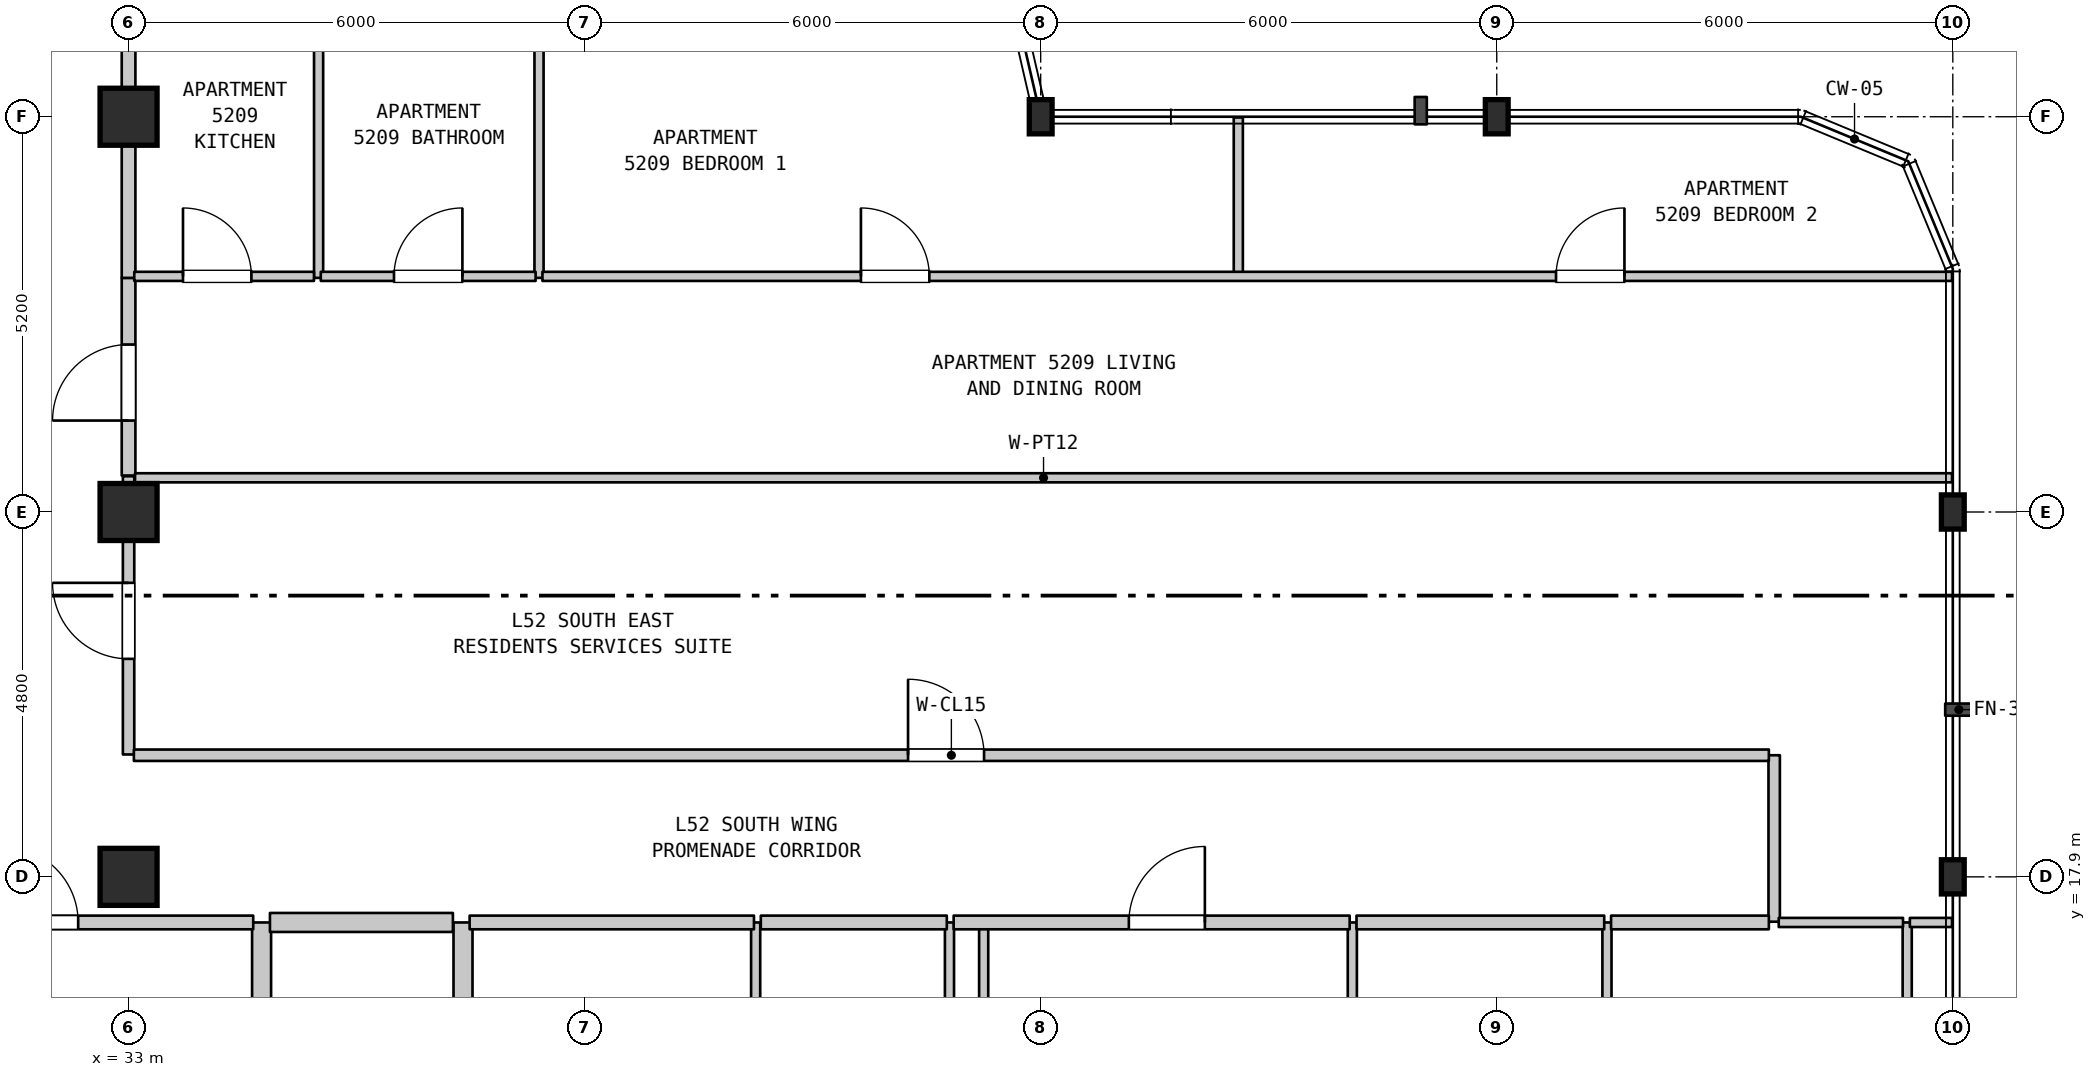
"""IFC4 building model, lengths in metres.
Left out: names, types, materials, properties, quantities, classifications, styles, units other than length and angle.
Written with IfcOpenShell. Run it as: python <this file> out.ifc"""

import sys

from ifc_helpers import new_model, si_unit, direction, frame, frame_2d, origin, origin_2d, place, context, subcontext, project, spatial, rectangle, i_section, extrude, element, fill, save


model = new_model("IFC4")
c1 = context("Model", 3, precision=1e-05, world=origin(), true_north=direction((0.0, 1.0)))
c2 = subcontext(c1, "Body", "Model", "MODEL_VIEW")
j1 = project(units=[si_unit("LENGTHUNIT", "METRE"), si_unit("PLANEANGLEUNIT", "RADIAN")], contexts=[c1])
p1 = place(None, origin())
s1 = spatial("IfcSite", under=j1, at=p1, CompositionType="ELEMENT")
p2 = place(p1, origin())
s2 = spatial("IfcBuilding", under=s1, at=p2, CompositionType="ELEMENT")
p3 = place(p2, frame((0.0, 0.0, 210.6)))
s3 = spatial("IfcBuildingStorey", under=s2, at=p3, CompositionType="ELEMENT", Elevation=210.6)
for number, where, z_axis, x_axis in (
    (1, (33.0, 17.9, 0.0), (0.0, 0.0, 1.0), (1.0, 0.0, 0.0)),
    (2, (33.0, 22.7, 0.0), (0.0, 0.0, 1.0), (1.0, 0.0, 0.0)),
    (3, (33.0, 27.9, 0.0), (0.0, 0.0, 1.0), (1.0, 0.0, 0.0)),
):
    element("IfcColumn", number, at=place(p3, frame(where, z_axis=z_axis, x_axis=x_axis)), inside=s3, PredefinedType="COLUMN", context=c2, shape_type="SweptSolid", body=[
        extrude(rectangle(XDim=0.75, YDim=0.75, at=origin_2d()), origin(), (0.0, 0.0, 1.0), 3.7),
    ])
for number, where, z_axis, x_axis in (
    (4, (45.0, 27.9, 0.0), (0.0, 0.0, 1.0), (1.0, 0.0, 0.0)),
    (5, (51.0, 27.9, 0.0), (0.0, 0.0, 1.0), (1.0, 0.0, 0.0)),
    (6, (57.0, 17.9, 0.0), (0.0, 0.0, 1.0), (1.0, 0.0, 0.0)),
    (7, (57.0, 22.7, 0.0), (0.0, 0.0, 1.0), (1.0, 0.0, 0.0)),
):
    element("IfcColumn", number, at=place(p3, frame(where, z_axis=z_axis, x_axis=x_axis)), inside=s3, PredefinedType="COLUMN", context=c2, shape_type="SweptSolid", body=[
        extrude(i_section(OverallWidth=0.3, OverallDepth=0.45, WebThickness=0.014, FlangeThickness=0.026, FilletRadius=0.027, at=origin_2d()), origin(), (0.0, 0.0, 1.0), 3.7),
    ])
p4 = place(p3, frame((33.0, 19.51, 0.0), z_axis=(0.0, 0.0, 1.0), x_axis=(0.0, 1.0, 0.0)))
e8 = element("IfcWall", 8, at=p4, inside=s3, PredefinedType="STANDARD", context=c2, shape_type="SweptSolid", body=[
    extrude(rectangle(XDim=3.66, YDim=0.15, at=frame_2d((1.83, 0.0))), origin(), (0.0, 0.0, 1.0), 2.99),
])
p5 = place(p4, frame((1.258, 0.0, 0.0)))
e9 = element("IfcOpeningElement", 9, at=p5, cuts=e8, PredefinedType="OPENING", context=c2, shape_type="SweptSolid", body=[
    extrude(rectangle(XDim=1.0, YDim=2.15, at=frame_2d((0.5, 1.075))), frame((0.0, 0.085, 0.0), z_axis=(0.0, -1.0, 0.0), x_axis=(1.0, 0.0, 0.0)), (0.0, 0.0, 1.0), 0.17),
])
p6 = place(p3, frame((33.0, 23.18, 0.0), z_axis=(0.0, 0.0, 1.0), x_axis=(0.0, 1.0, 0.0)))
e10 = element("IfcWall", 10, at=p6, inside=s3, PredefinedType="STANDARD", context=c2, shape_type="SweptSolid", body=[
    extrude(rectangle(XDim=2.6, YDim=0.18, at=frame_2d((1.3, 0.0))), origin(), (0.0, 0.0, 1.0), 2.99),
])
p7 = place(p6, frame((0.723, 0.0, 0.0)))
e11 = element("IfcOpeningElement", 11, at=p7, cuts=e10, PredefinedType="OPENING", context=c2, shape_type="SweptSolid", body=[
    extrude(rectangle(XDim=1.0, YDim=2.15, at=frame_2d((0.5, 1.075))), frame((0.0, 0.1, 0.0), z_axis=(0.0, -1.0, 0.0), x_axis=(1.0, 0.0, 0.0)), (0.0, 0.0, 1.0), 0.2),
])
p8 = place(p3, frame((33.0, 25.78, 0.0), z_axis=(0.0, 0.0, 1.0), x_axis=(0.0, 1.0, 0.0)))
e12 = element("IfcWall", 12, at=p8, inside=s3, PredefinedType="STANDARD", context=c2, shape_type="SweptSolid", body=[
    extrude(rectangle(XDim=2.12, YDim=0.18, at=frame_2d((1.06, 0.0))), origin(), (0.0, 0.0, 1.0), 2.99),
])
p9 = place(p3, frame((34.75, 11.15, 0.0), z_axis=(0.0, 0.0, 1.0), x_axis=(0.0, 1.0, 0.0)))
e13 = element("IfcWall", 13, at=p9, inside=s3, PredefinedType="STANDARD", context=c2, shape_type="SweptSolid", body=[
    extrude(rectangle(XDim=6.15, YDim=0.25, at=frame_2d((3.075, 0.0))), origin(), (0.0, 0.0, 1.0), 3.39),
])
p10 = place(p3, frame((35.5, 25.78, 0.0), z_axis=(0.0, 0.0, 1.0), x_axis=(0.0, 1.0, 0.0)))
e14 = element("IfcWall", 14, at=p10, inside=s3, PredefinedType="PARTITIONING", context=c2, shape_type="SweptSolid", body=[
    extrude(rectangle(XDim=3.38, YDim=0.12, at=frame_2d((1.69, 0.0))), origin(), (0.0, 0.0, 1.0), 3.39),
])
p11 = place(p3, frame((37.4, 11.15, 0.0), z_axis=(0.0, 0.0, 1.0), x_axis=(0.0, 1.0, 0.0)))
e15 = element("IfcWall", 15, at=p11, inside=s3, PredefinedType="STANDARD", context=c2, shape_type="SweptSolid", body=[
    extrude(rectangle(XDim=6.15, YDim=0.25, at=frame_2d((3.075, 0.0))), origin(), (0.0, 0.0, 1.0), 3.39),
])
p12 = place(p3, frame((38.4, 25.78, 0.0), z_axis=(0.0, 0.0, 1.0), x_axis=(0.0, 1.0, 0.0)))
e16 = element("IfcWall", 16, at=p12, inside=s3, PredefinedType="PARTITIONING", context=c2, shape_type="SweptSolid", body=[
    extrude(rectangle(XDim=3.38, YDim=0.12, at=frame_2d((1.69, 0.0))), origin(), (0.0, 0.0, 1.0), 3.39),
])
for number, where, z_axis, x_axis in (
    (17, (41.25, 11.15, 0.0), (0.0, 0.0, 1.0), (0.0, 1.0, 0.0)),
    (18, (43.8, 11.15, 0.0), (0.0, 0.0, 1.0), (0.0, 1.0, 0.0)),
):
    element("IfcWall", number, at=place(p3, frame(where, z_axis=z_axis, x_axis=x_axis)), inside=s3, PredefinedType="PARTITIONING", context=c2, shape_type="SweptSolid", body=[
        extrude(rectangle(XDim=6.15, YDim=0.12, at=frame_2d((3.075, 0.0))), origin(), (0.0, 0.0, 1.0), 3.39),
    ])
p13 = place(p3, frame((44.25, 14.85, 0.0), z_axis=(0.0, 0.0, 1.0), x_axis=(0.0, 1.0, 0.0)))
e19 = element("IfcWall", 19, at=p13, inside=s3, PredefinedType="PARTITIONING", context=c2, shape_type="SweptSolid", body=[
    extrude(rectangle(XDim=2.45, YDim=0.12, at=frame_2d((1.225, 0.0))), origin(), (0.0, 0.0, 1.0), 3.39),
])
p14 = place(p3, frame((47.6, 25.78, 0.0), z_axis=(0.0, 0.0, 1.0), x_axis=(0.0, 1.0, 0.0)))
e20 = element("IfcWall", 20, at=p14, inside=s3, PredefinedType="PARTITIONING", context=c2, shape_type="SweptSolid", body=[
    extrude(rectangle(XDim=2.11, YDim=0.12, at=frame_2d((1.055, 0.0))), origin(), (0.0, 0.0, 1.0), 3.39),
])
for number, where, z_axis, x_axis in (
    (21, (49.1, 11.15, 0.0), (0.0, 0.0, 1.0), (0.0, 1.0, 0.0)),
    (22, (52.45, 11.15, 0.0), (0.0, 0.0, 1.0), (0.0, 1.0, 0.0)),
):
    element("IfcWall", number, at=place(p3, frame(where, z_axis=z_axis, x_axis=x_axis)), inside=s3, PredefinedType="PARTITIONING", context=c2, shape_type="SweptSolid", body=[
        extrude(rectangle(XDim=6.15, YDim=0.12, at=frame_2d((3.075, 0.0))), origin(), (0.0, 0.0, 1.0), 3.39),
    ])
p15 = place(p3, frame((54.65, 17.31, 0.0), z_axis=(0.0, 0.0, 1.0), x_axis=(0.0, 1.0, 0.0)))
e23 = element("IfcWall", 23, at=p15, inside=s3, PredefinedType="STANDARD", context=c2, shape_type="SweptSolid", body=[
    extrude(rectangle(XDim=2.19, YDim=0.15, at=frame_2d((1.095, 0.0))), origin(), (0.0, 0.0, 1.0), 3.39),
])
p16 = place(p3, frame((56.4, 11.15, 0.0), z_axis=(0.0, 0.0, 1.0), x_axis=(0.0, 1.0, 0.0)))
e24 = element("IfcWall", 24, at=p16, inside=s3, PredefinedType="PARTITIONING", context=c2, shape_type="SweptSolid", body=[
    extrude(rectangle(XDim=6.15, YDim=0.12, at=frame_2d((3.075, 0.0))), origin(), (0.0, 0.0, 1.0), 3.39),
])
p17 = place(p3, frame((29.545, 17.3, 0.0), z_axis=(0.0, 0.0, 1.0), x_axis=(1.0, 0.0, 0.0)))
e25 = element("IfcWall", 25, at=p17, inside=s3, PredefinedType="STANDARD", context=c2, shape_type="SweptSolid", body=[
    extrude(rectangle(XDim=5.095, YDim=0.18, at=frame_2d((2.547, 0.0))), origin(), (0.0, 0.0, 1.0), 3.39),
])
p18 = place(p17, frame((1.792, 0.0, 0.0)))
e26 = element("IfcOpeningElement", 26, at=p18, cuts=e25, PredefinedType="OPENING", context=c2, shape_type="SweptSolid", body=[
    extrude(rectangle(XDim=1.0, YDim=2.15, at=frame_2d((0.5, 1.075))), frame((0.0, 0.1, 0.0), z_axis=(0.0, -1.0, 0.0), x_axis=(1.0, 0.0, 0.0)), (0.0, 0.0, 1.0), 0.2),
])
p19 = place(p3, frame((34.86, 17.3, 0.0), z_axis=(0.0, 0.0, 1.0), x_axis=(1.0, 0.0, 0.0)))
e27 = element("IfcWall", 27, at=p19, inside=s3, PredefinedType="STANDARD", context=c2, shape_type="SweptSolid", body=[
    extrude(rectangle(XDim=2.407, YDim=0.25, at=frame_2d((1.204, 0.0))), origin(), (0.0, 0.0, 1.0), 3.39),
])
p20 = place(p3, frame((37.487, 17.3, 0.0), z_axis=(0.0, 0.0, 1.0), x_axis=(1.0, 0.0, 0.0)))
e28 = element("IfcWall", 28, at=p20, inside=s3, PredefinedType="STANDARD", context=c2, shape_type="SweptSolid", body=[
    extrude(rectangle(XDim=3.741, YDim=0.18, at=frame_2d((1.871, 0.0))), origin(), (0.0, 0.0, 1.0), 3.39),
])
p21 = place(p3, frame((41.318, 17.3, 0.0), z_axis=(0.0, 0.0, 1.0), x_axis=(1.0, 0.0, 0.0)))
e29 = element("IfcWall", 29, at=p21, inside=s3, PredefinedType="STANDARD", context=c2, shape_type="SweptSolid", body=[
    extrude(rectangle(XDim=2.447, YDim=0.18, at=frame_2d((1.223, 0.0))), origin(), (0.0, 0.0, 1.0), 3.39),
])
p22 = place(p3, frame((43.855, 17.3, 0.0), z_axis=(0.0, 0.0, 1.0), x_axis=(1.0, 0.0, 0.0)))
e30 = element("IfcWall", 30, at=p22, inside=s3, PredefinedType="STANDARD", context=c2, shape_type="SweptSolid", body=[
    extrude(rectangle(XDim=5.21, YDim=0.18, at=frame_2d((2.605, 0.0))), origin(), (0.0, 0.0, 1.0), 3.39),
])
p23 = place(p22, frame((2.305, 0.0, 0.0)))
e31 = element("IfcOpeningElement", 31, at=p23, cuts=e30, PredefinedType="OPENING", context=c2, shape_type="SweptSolid", body=[
    extrude(rectangle(XDim=1.0, YDim=2.15, at=frame_2d((0.5, 1.075))), frame((0.0, 0.1, 0.0), z_axis=(0.0, -1.0, 0.0), x_axis=(1.0, 0.0, 0.0)), (0.0, 0.0, 1.0), 0.2),
])
p24 = place(p3, frame((49.155, 17.3, 0.0), z_axis=(0.0, 0.0, 1.0), x_axis=(1.0, 0.0, 0.0)))
e32 = element("IfcWall", 32, at=p24, inside=s3, PredefinedType="STANDARD", context=c2, shape_type="SweptSolid", body=[
    extrude(rectangle(XDim=3.259, YDim=0.18, at=frame_2d((1.629, 0.0))), origin(), (0.0, 0.0, 1.0), 3.39),
])
p25 = place(p3, frame((52.504, 17.3, 0.0), z_axis=(0.0, 0.0, 1.0), x_axis=(1.0, 0.0, 0.0)))
e33 = element("IfcWall", 33, at=p25, inside=s3, PredefinedType="STANDARD", context=c2, shape_type="SweptSolid", body=[
    extrude(rectangle(XDim=2.076, YDim=0.18, at=frame_2d((1.038, 0.0))), origin(), (0.0, 0.0, 1.0), 3.39),
])
p26 = place(p3, frame((54.71, 17.3, 0.0), z_axis=(0.0, 0.0, 1.0), x_axis=(1.0, 0.0, 0.0)))
e34 = element("IfcWall", 34, at=p26, inside=s3, PredefinedType="PARTITIONING", context=c2, shape_type="SweptSolid", body=[
    extrude(rectangle(XDim=1.635, YDim=0.12, at=frame_2d((0.817, 0.0))), origin(), (0.0, 0.0, 1.0), 3.39),
])
p27 = place(p3, frame((56.435, 17.3, 0.0), z_axis=(0.0, 0.0, 1.0), x_axis=(1.0, 0.0, 0.0)))
e35 = element("IfcWall", 35, at=p27, inside=s3, PredefinedType="PARTITIONING", context=c2, shape_type="SweptSolid", body=[
    extrude(rectangle(XDim=0.555, YDim=0.12, at=frame_2d((0.277, 0.0))), origin(), (0.0, 0.0, 1.0), 3.39),
])
p28 = place(p3, frame((33.07, 19.5, 0.0), z_axis=(0.0, 0.0, 1.0), x_axis=(1.0, 0.0, 0.0)))
e36 = element("IfcWall", 36, at=p28, inside=s3, PredefinedType="STANDARD", context=c2, shape_type="SweptSolid", body=[
    extrude(rectangle(XDim=21.51, YDim=0.15, at=frame_2d((10.755, 0.0))), origin(), (0.0, 0.0, 1.0), 3.39),
])
p29 = place(p28, frame((10.185, 0.0, 0.0)))
e37 = element("IfcOpeningElement", 37, at=p29, cuts=e36, PredefinedType="OPENING", context=c2, shape_type="SweptSolid", body=[
    extrude(rectangle(XDim=1.0, YDim=2.15, at=frame_2d((0.5, 1.075))), frame((0.0, 0.085, 0.0), z_axis=(0.0, -1.0, 0.0), x_axis=(1.0, 0.0, 0.0)), (0.0, 0.0, 1.0), 0.17),
])
p30 = place(p3, frame((33.085, 23.15, 0.0), z_axis=(0.0, 0.0, 1.0), x_axis=(1.0, 0.0, 0.0)))
e38 = element("IfcWall", 38, at=p30, inside=s3, PredefinedType="PARTITIONING", context=c2, shape_type="SweptSolid", body=[
    extrude(rectangle(XDim=23.905, YDim=0.12, at=frame_2d((11.953, 0.0))), origin(), (0.0, 0.0, 1.0), 3.39),
])
p31 = place(p3, frame((33.075, 25.8, 0.0), z_axis=(0.0, 0.0, 1.0), x_axis=(1.0, 0.0, 0.0)))
e39 = element("IfcWall", 39, at=p31, inside=s3, PredefinedType="PARTITIONING", context=c2, shape_type="SweptSolid", body=[
    extrude(rectangle(XDim=2.364, YDim=0.12, at=frame_2d((1.182, 0.0))), origin(), (0.0, 0.0, 1.0), 3.39),
])
p32 = place(p31, frame((0.641, 0.0, 0.0)))
e40 = element("IfcOpeningElement", 40, at=p32, cuts=e39, PredefinedType="OPENING", context=c2, shape_type="SweptSolid", body=[
    extrude(rectangle(XDim=0.9, YDim=2.15, at=frame_2d((0.45, 1.075))), frame((0.0, 0.07, 0.0), z_axis=(0.0, -1.0, 0.0), x_axis=(1.0, 0.0, 0.0)), (0.0, 0.0, 1.0), 0.14),
])
p33 = place(p3, frame((35.529, 25.8, 0.0), z_axis=(0.0, 0.0, 1.0), x_axis=(1.0, 0.0, 0.0)))
e41 = element("IfcWall", 41, at=p33, inside=s3, PredefinedType="PARTITIONING", context=c2, shape_type="SweptSolid", body=[
    extrude(rectangle(XDim=2.826, YDim=0.12, at=frame_2d((1.413, 0.0))), origin(), (0.0, 0.0, 1.0), 3.39),
])
p34 = place(p33, frame((0.963, 0.0, 0.0)))
e42 = element("IfcOpeningElement", 42, at=p34, cuts=e41, PredefinedType="OPENING", context=c2, shape_type="SweptSolid", body=[
    extrude(rectangle(XDim=0.9, YDim=2.1, at=frame_2d((0.45, 1.05))), frame((0.0, 0.07, 0.0), z_axis=(0.0, -1.0, 0.0), x_axis=(1.0, 0.0, 0.0)), (0.0, 0.0, 1.0), 0.14),
])
p35 = place(p3, frame((38.445, 25.8, 0.0), z_axis=(0.0, 0.0, 1.0), x_axis=(1.0, 0.0, 0.0)))
e43 = element("IfcWall", 43, at=p35, inside=s3, PredefinedType="PARTITIONING", context=c2, shape_type="SweptSolid", body=[
    extrude(rectangle(XDim=18.545, YDim=0.12, at=frame_2d((9.272, 0.0))), origin(), (0.0, 0.0, 1.0), 3.39),
])
p36 = place(p35, frame((4.19, 0.0, 0.0)))
e44 = element("IfcOpeningElement", 44, at=p36, cuts=e43, PredefinedType="OPENING", context=c2, shape_type="SweptSolid", body=[
    extrude(rectangle(XDim=0.9, YDim=2.15, at=frame_2d((0.45, 1.075))), frame((0.0, 0.07, 0.0), z_axis=(0.0, -1.0, 0.0), x_axis=(1.0, 0.0, 0.0)), (0.0, 0.0, 1.0), 0.14),
])
p37 = place(p35, frame((13.335, 0.0, 0.0)))
e45 = element("IfcOpeningElement", 45, at=p37, cuts=e43, PredefinedType="OPENING", context=c2, shape_type="SweptSolid", body=[
    extrude(rectangle(XDim=0.9, YDim=2.15, at=frame_2d((0.45, 1.075))), frame((0.0, 0.07, 0.0), z_axis=(0.0, -1.0, 0.0), x_axis=(1.0, 0.0, 0.0)), (0.0, 0.0, 1.0), 0.14),
])
p38 = place(p3, frame((33.0, 27.9, 0.0), z_axis=(0.0, 0.0, 1.0), x_axis=(0.0, 1.0, 0.0)))
e46 = element("IfcWall", 46, at=p38, inside=s3, PredefinedType="STANDARD", context=c2, shape_type="SweptSolid", body=[
    extrude(rectangle(XDim=1.26, YDim=0.18, at=frame_2d((0.63, 0.0))), origin(), (0.0, 0.0, 1.0), 2.89),
])
p39 = place(p5, origin())
e47 = element("IfcDoor", 47, at=p39, inside=s3, OperationType="SINGLE_SWING_RIGHT", PredefinedType="DOOR", context=c2, shape_type="SweptSolid", body=[
    extrude(rectangle(XDim=1.0, YDim=2.15, at=frame_2d((0.5, 1.075))), frame((0.0, 0.025, 0.0), z_axis=(0.0, -1.0, 0.0), x_axis=(1.0, 0.0, 0.0)), (0.0, 0.0, 1.0), 0.05),
])
fill(e9, e47)
p40 = place(p7, origin())
e48 = element("IfcDoor", 48, at=p40, inside=s3, OperationType="SINGLE_SWING_LEFT", PredefinedType="DOOR", context=c2, shape_type="SweptSolid", body=[
    extrude(rectangle(XDim=1.0, YDim=2.15, at=frame_2d((0.5, 1.075))), frame((0.0, 0.025, 0.0), z_axis=(0.0, -1.0, 0.0), x_axis=(1.0, 0.0, 0.0)), (0.0, 0.0, 1.0), 0.05),
])
fill(e11, e48)
p41 = place(p18, origin())
e49 = element("IfcDoor", 49, at=p41, inside=s3, OperationType="SINGLE_SWING_LEFT", PredefinedType="DOOR", context=c2, shape_type="SweptSolid", body=[
    extrude(rectangle(XDim=1.0, YDim=2.15, at=frame_2d((0.5, 1.075))), frame((0.0, 0.025, 0.0), z_axis=(0.0, -1.0, 0.0), x_axis=(1.0, 0.0, 0.0)), (0.0, 0.0, 1.0), 0.05),
])
fill(e26, e49)
p42 = place(p23, origin())
e50 = element("IfcDoor", 50, at=p42, inside=s3, OperationType="SINGLE_SWING_RIGHT", PredefinedType="DOOR", context=c2, shape_type="SweptSolid", body=[
    extrude(rectangle(XDim=1.0, YDim=2.15, at=frame_2d((0.5, 1.075))), frame((0.0, 0.025, 0.0), z_axis=(0.0, -1.0, 0.0), x_axis=(1.0, 0.0, 0.0)), (0.0, 0.0, 1.0), 0.05),
])
fill(e31, e50)
p43 = place(p29, origin())
e51 = element("IfcDoor", 51, at=p43, inside=s3, OperationType="SINGLE_SWING_LEFT", PredefinedType="DOOR", context=c2, shape_type="SweptSolid", body=[
    extrude(rectangle(XDim=1.0, YDim=2.15, at=frame_2d((0.5, 1.075))), frame((0.0, 0.025, 0.0), z_axis=(0.0, -1.0, 0.0), x_axis=(1.0, 0.0, 0.0)), (0.0, 0.0, 1.0), 0.05),
])
fill(e37, e51)
p44 = place(p32, origin())
e52 = element("IfcDoor", 52, at=p44, inside=s3, OperationType="SINGLE_SWING_LEFT", PredefinedType="DOOR", context=c2, shape_type="SweptSolid", body=[
    extrude(rectangle(XDim=0.9, YDim=2.15, at=frame_2d((0.45, 1.075))), frame((0.0, 0.025, 0.0), z_axis=(0.0, -1.0, 0.0), x_axis=(1.0, 0.0, 0.0)), (0.0, 0.0, 1.0), 0.05),
])
fill(e40, e52)
p45 = place(p34, origin())
e53 = element("IfcDoor", 53, at=p45, inside=s3, OperationType="SINGLE_SWING_RIGHT", PredefinedType="DOOR", context=c2, shape_type="SweptSolid", body=[
    extrude(rectangle(XDim=0.9, YDim=2.1, at=frame_2d((0.45, 1.05))), frame((0.0, 0.025, 0.0), z_axis=(0.0, -1.0, 0.0), x_axis=(1.0, 0.0, 0.0)), (0.0, 0.0, 1.0), 0.05),
])
fill(e42, e53)
p46 = place(p36, origin())
e54 = element("IfcDoor", 54, at=p46, inside=s3, OperationType="SINGLE_SWING_LEFT", PredefinedType="DOOR", context=c2, shape_type="SweptSolid", body=[
    extrude(rectangle(XDim=0.9, YDim=2.15, at=frame_2d((0.45, 1.075))), frame((0.0, 0.025, 0.0), z_axis=(0.0, -1.0, 0.0), x_axis=(1.0, 0.0, 0.0)), (0.0, 0.0, 1.0), 0.05),
])
fill(e44, e54)
p47 = place(p37, origin())
e55 = element("IfcDoor", 55, at=p47, inside=s3, OperationType="SINGLE_SWING_RIGHT", PredefinedType="DOOR", context=c2, shape_type="SweptSolid", body=[
    extrude(rectangle(XDim=0.9, YDim=2.15, at=frame_2d((0.45, 1.075))), frame((0.0, 0.025, 0.0), z_axis=(0.0, -1.0, 0.0), x_axis=(1.0, 0.0, 0.0)), (0.0, 0.0, 1.0), 0.05),
])
fill(e45, e55)
save(model, sys.argv[1])
